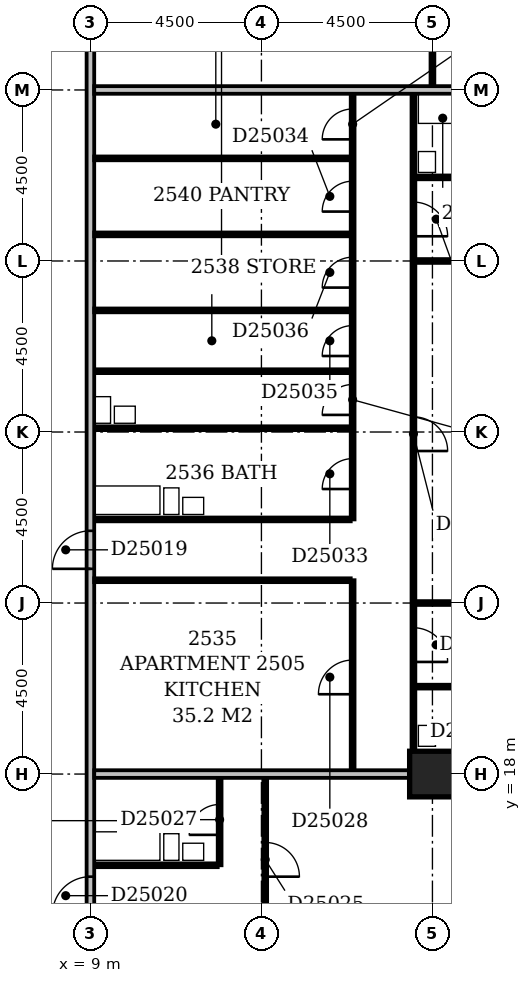
"""IFC4 building model, lengths in metres.
Left out: names, types, materials, properties, quantities, classifications, styles, units other than length and angle.
Written with IfcOpenShell. Run it as: python <this file> out.ifc"""

import sys

from ifc_helpers import new_model, si_unit, direction, frame, frame_2d, origin, origin_2d, place, context, subcontext, project, spatial, rectangle, extrude, element, fill, save


model = new_model("IFC4")
c1 = context("Model", 3, precision=1e-05, world=origin(), true_north=direction((0.0, 1.0)))
c2 = subcontext(c1, "Body", "Model", "MODEL_VIEW")
j1 = project(units=[si_unit("LENGTHUNIT", "METRE"), si_unit("PLANEANGLEUNIT", "RADIAN")], contexts=[c1])
p1 = place(None, origin())
s1 = spatial("IfcSite", under=j1, at=p1, CompositionType="ELEMENT")
p2 = place(p1, origin())
s2 = spatial("IfcBuilding", under=s1, at=p2, CompositionType="ELEMENT")
p3 = place(p2, frame((0.0, 0.0, 101.0)))
s3 = spatial("IfcBuildingStorey", under=s2, at=p3, CompositionType="ELEMENT", Elevation=101.0)
p4 = place(p3, frame((18.0, 18.0, -0.3), z_axis=(0.0, 0.0, 1.0), x_axis=(1.0, 0.0, 0.0)))
e1 = element("IfcColumn", 1, at=p4, inside=s3, PredefinedType="COLUMN", context=c2, shape_type="SweptSolid", body=[
    extrude(rectangle(XDim=1.2, YDim=1.2, at=origin_2d()), origin(), (0.0, 0.0, 1.0), 3.6),
])
p5 = place(p3, frame((9.0, 5.0, 0.0), z_axis=(0.0, 0.0, 1.0), x_axis=(0.0, 1.0, 0.0)))
e2 = element("IfcWall", 2, at=p5, inside=s3, PredefinedType="PARTITIONING", context=c2, shape_type="SweptSolid", body=[
    extrude(rectangle(XDim=44.5, YDim=0.2, at=frame_2d((22.25, 0.0))), origin(), (0.0, 0.0, 1.0), 3.3),
])
p6 = place(p5, frame((18.4, 0.0, 0.0)))
e3 = element("IfcOpeningElement", 3, at=p6, cuts=e2, PredefinedType="OPENING", context=c2, shape_type="SweptSolid", body=[
    extrude(rectangle(XDim=1.0, YDim=2.1, at=frame_2d((0.5, 1.05))), frame((0.0, 0.112, 0.0), z_axis=(0.0, -1.0, 0.0), x_axis=(1.0, 0.0, 0.0)), (0.0, 0.0, 1.0), 0.224),
])
p7 = place(p5, frame((9.3, 0.0, 0.0)))
e4 = element("IfcOpeningElement", 4, at=p7, cuts=e2, PredefinedType="OPENING", context=c2, shape_type="SweptSolid", body=[
    extrude(rectangle(XDim=1.0, YDim=2.1, at=frame_2d((0.5, 1.05))), frame((0.0, 0.112, 0.0), z_axis=(0.0, -1.0, 0.0), x_axis=(1.0, 0.0, 0.0)), (0.0, 0.0, 1.0), 0.224),
])
p8 = place(p5, frame((37.25, 0.0, 0.0)))
e5 = element("IfcOpeningElement", 5, at=p8, cuts=e2, PredefinedType="OPENING", context=c2, shape_type="SweptSolid", body=[
    extrude(rectangle(XDim=0.9, YDim=2.1, at=frame_2d((0.45, 1.05))), frame((0.0, 0.112, 0.0), z_axis=(0.0, -1.0, 0.0), x_axis=(1.0, 0.0, 0.0)), (0.0, 0.0, 1.0), 0.224),
])
p9 = place(p5, frame((1.5, 0.0, 0.0)))
e6 = element("IfcOpeningElement", 6, at=p9, cuts=e2, PredefinedType="OPENING", context=c2, shape_type="SweptSolid", body=[
    extrude(rectangle(XDim=0.9, YDim=2.1, at=frame_2d((0.45, 1.05))), frame((0.0, 0.112, 0.0), z_axis=(0.0, -1.0, 0.0), x_axis=(1.0, 0.0, 0.0)), (0.0, 0.0, 1.0), 0.224),
])
p10 = place(p3, frame((13.6, 9.6, 0.0), z_axis=(0.0, 0.0, 1.0), x_axis=(0.0, 1.0, 0.0)))
e7 = element("IfcWall", 7, at=p10, inside=s3, PredefinedType="PARTITIONING", context=c2, shape_type="SweptSolid", body=[
    extrude(rectangle(XDim=8.3, YDim=0.1, at=frame_2d((4.15, 0.0))), origin(), (0.0, 0.0, 1.0), 3.3),
])
p11 = place(p10, frame((1.2, 0.0, 0.0)))
e8 = element("IfcOpeningElement", 8, at=p11, cuts=e7, PredefinedType="OPENING", context=c2, shape_type="SweptSolid", body=[
    extrude(rectangle(XDim=0.9, YDim=2.1, at=frame_2d((0.45, 1.05))), frame((0.0, 0.062, 0.0), z_axis=(0.0, -1.0, 0.0), x_axis=(1.0, 0.0, 0.0)), (0.0, 0.0, 1.0), 0.124),
])
p12 = place(p10, frame((5.7, 0.0, 0.0)))
e9 = element("IfcOpeningElement", 9, at=p12, cuts=e7, PredefinedType="OPENING", context=c2, shape_type="SweptSolid", body=[
    extrude(rectangle(XDim=0.9, YDim=2.1, at=frame_2d((0.45, 1.05))), frame((0.0, 0.062, 0.0), z_axis=(0.0, -1.0, 0.0), x_axis=(1.0, 0.0, 0.0)), (0.0, 0.0, 1.0), 0.124),
])
p13 = place(p3, frame((9.1, 15.6, 0.0), z_axis=(0.0, 0.0, 1.0), x_axis=(1.0, 0.0, 0.0)))
e10 = element("IfcWall", 10, at=p13, inside=s3, PredefinedType="PLUMBINGWALL", context=c2, shape_type="SweptSolid", body=[
    extrude(rectangle(XDim=3.25, YDim=0.1, at=frame_2d((1.625, 0.0))), origin(), (0.0, 0.0, 1.0), 3.3),
])
p14 = place(p3, frame((12.4, 15.6, 0.0), z_axis=(0.0, 0.0, 1.0), x_axis=(0.0, 1.0, 0.0)))
e11 = element("IfcWall", 11, at=p14, inside=s3, PredefinedType="PARTITIONING", context=c2, shape_type="SweptSolid", body=[
    extrude(rectangle(XDim=2.3, YDim=0.1, at=frame_2d((1.15, 0.0))), origin(), (0.0, 0.0, 1.0), 3.3),
])
p15 = place(p14, frame((0.8, 0.0, 0.0)))
e12 = element("IfcOpeningElement", 12, at=p15, cuts=e11, PredefinedType="OPENING", context=c2, shape_type="SweptSolid", body=[
    extrude(rectangle(XDim=0.8, YDim=2.1, at=frame_2d((0.4, 1.05))), frame((0.0, 0.062, 0.0), z_axis=(0.0, -1.0, 0.0), x_axis=(1.0, 0.0, 0.0)), (0.0, 0.0, 1.0), 0.124),
])
p16 = place(p3, frame((9.1, 18.0, 0.0), z_axis=(0.0, 0.0, 1.0), x_axis=(1.0, 0.0, 0.0)))
e13 = element("IfcWall", 13, at=p16, inside=s3, PredefinedType="PARTITIONING", context=c2, shape_type="SweptSolid", body=[
    extrude(rectangle(XDim=8.3, YDim=0.2, at=frame_2d((4.15, 0.0))), origin(), (0.0, 0.0, 1.0), 2.6),
])
p17 = place(p3, frame((15.9, 18.1, 0.0), z_axis=(0.0, 0.0, 1.0), x_axis=(0.0, 1.0, 0.0)))
e14 = element("IfcWall", 14, at=p17, inside=s3, PredefinedType="PARTITIONING", context=c2, shape_type="SweptSolid", body=[
    extrude(rectangle(XDim=5.0, YDim=0.1, at=frame_2d((2.5, 0.0))), origin(), (0.0, 0.0, 1.0), 3.3),
])
p18 = place(p17, frame((2.0, 0.0, 0.0)))
e15 = element("IfcOpeningElement", 15, at=p18, cuts=e14, PredefinedType="OPENING", context=c2, shape_type="SweptSolid", body=[
    extrude(rectangle(XDim=0.9, YDim=2.1, at=frame_2d((0.45, 1.05))), frame((0.0, 0.062, 0.0), z_axis=(0.0, -1.0, 0.0), x_axis=(1.0, 0.0, 0.0)), (0.0, 0.0, 1.0), 0.124),
])
p19 = place(p3, frame((17.5, 18.1, 0.0), z_axis=(0.0, 0.0, 1.0), x_axis=(0.0, 1.0, 0.0)))
e16 = element("IfcWall", 16, at=p19, inside=s3, PredefinedType="PARTITIONING", context=c2, shape_type="SweptSolid", body=[
    extrude(rectangle(XDim=17.8, YDim=0.1, at=frame_2d((8.9, 0.0))), origin(), (0.0, 0.0, 1.0), 3.3),
])
p20 = place(p19, frame((2.85, 0.0, 0.0)))
e17 = element("IfcOpeningElement", 17, at=p20, cuts=e16, PredefinedType="OPENING", context=c2, shape_type="SweptSolid", body=[
    extrude(rectangle(XDim=0.9, YDim=2.1, at=frame_2d((0.45, 1.05))), frame((0.0, 0.062, 0.0), z_axis=(0.0, -1.0, 0.0), x_axis=(1.0, 0.0, 0.0)), (0.0, 0.0, 1.0), 0.124),
])
p21 = place(p19, frame((8.4, 0.0, 0.0)))
e18 = element("IfcOpeningElement", 18, at=p21, cuts=e16, PredefinedType="OPENING", context=c2, shape_type="SweptSolid", body=[
    extrude(rectangle(XDim=0.9, YDim=2.1, at=frame_2d((0.45, 1.05))), frame((0.0, 0.062, 0.0), z_axis=(0.0, -1.0, 0.0), x_axis=(1.0, 0.0, 0.0)), (0.0, 0.0, 1.0), 0.124),
])
p22 = place(p19, frame((14.05, 0.0, 0.0)))
e19 = element("IfcOpeningElement", 19, at=p22, cuts=e16, PredefinedType="OPENING", context=c2, shape_type="SweptSolid", body=[
    extrude(rectangle(XDim=0.9, YDim=2.1, at=frame_2d((0.45, 1.05))), frame((0.0, 0.062, 0.0), z_axis=(0.0, -1.0, 0.0), x_axis=(1.0, 0.0, 0.0)), (0.0, 0.0, 1.0), 0.124),
])
p23 = place(p3, frame((17.55, 20.3, 0.0), z_axis=(0.0, 0.0, 1.0), x_axis=(1.0, 0.0, 0.0)))
e20 = element("IfcWall", 20, at=p23, inside=s3, PredefinedType="PLUMBINGWALL", context=c2, shape_type="SweptSolid", body=[
    extrude(rectangle(XDim=4.0, YDim=0.1, at=frame_2d((2.0, 0.0))), origin(), (0.0, 0.0, 1.0), 3.3),
])
p24 = place(p23, frame((1.0, 0.0, 0.0)))
e21 = element("IfcOpeningElement", 21, at=p24, cuts=e20, PredefinedType="OPENING", context=c2, shape_type="SweptSolid", body=[
    extrude(rectangle(XDim=0.8, YDim=2.1, at=frame_2d((0.4, 1.05))), frame((0.0, 0.062, 0.0), z_axis=(0.0, -1.0, 0.0), x_axis=(1.0, 0.0, 0.0)), (0.0, 0.0, 1.0), 0.124),
])
p25 = place(p3, frame((17.55, 22.5, 0.0), z_axis=(0.0, 0.0, 1.0), x_axis=(1.0, 0.0, 0.0)))
e22 = element("IfcWall", 22, at=p25, inside=s3, PredefinedType="PARTITIONING", context=c2, shape_type="SweptSolid", body=[
    extrude(rectangle(XDim=4.35, YDim=0.1, at=frame_2d((2.175, 0.0))), origin(), (0.0, 0.0, 1.0), 3.3),
])
p26 = place(p3, frame((9.1, 23.1, 0.0), z_axis=(0.0, 0.0, 1.0), x_axis=(1.0, 0.0, 0.0)))
e23 = element("IfcWall", 23, at=p26, inside=s3, PredefinedType="PARTITIONING", context=c2, shape_type="SweptSolid", body=[
    extrude(rectangle(XDim=6.75, YDim=0.1, at=frame_2d((3.375, 0.0))), origin(), (0.0, 0.0, 1.0), 3.3),
])
p27 = place(p3, frame((9.1, 24.7, 0.0), z_axis=(0.0, 0.0, 1.0), x_axis=(1.0, 0.0, 0.0)))
e24 = element("IfcWall", 24, at=p27, inside=s3, PredefinedType="PLUMBINGWALL", context=c2, shape_type="SweptSolid", body=[
    extrude(rectangle(XDim=6.75, YDim=0.1, at=frame_2d((3.375, 0.0))), origin(), (0.0, 0.0, 1.0), 3.3),
])
p28 = place(p3, frame((15.9, 24.7, 0.0), z_axis=(0.0, 0.0, 1.0), x_axis=(0.0, 1.0, 0.0)))
e25 = element("IfcWall", 25, at=p28, inside=s3, PredefinedType="PARTITIONING", context=c2, shape_type="SweptSolid", body=[
    extrude(rectangle(XDim=11.2, YDim=0.1, at=frame_2d((5.6, 0.0))), origin(), (0.0, 0.0, 1.0), 3.3),
])
p29 = place(p28, frame((0.8, 0.0, 0.0)))
e26 = element("IfcOpeningElement", 26, at=p29, cuts=e25, PredefinedType="OPENING", context=c2, shape_type="SweptSolid", body=[
    extrude(rectangle(XDim=0.8, YDim=2.1, at=frame_2d((0.4, 1.05))), frame((0.0, 0.062, 0.0), z_axis=(0.0, -1.0, 0.0), x_axis=(1.0, 0.0, 0.0)), (0.0, 0.0, 1.0), 0.124),
])
p30 = place(p28, frame((8.1, 0.0, 0.0)))
e27 = element("IfcOpeningElement", 27, at=p30, cuts=e25, PredefinedType="OPENING", context=c2, shape_type="SweptSolid", body=[
    extrude(rectangle(XDim=0.8, YDim=2.1, at=frame_2d((0.4, 1.05))), frame((0.0, 0.062, 0.0), z_axis=(0.0, -1.0, 0.0), x_axis=(1.0, 0.0, 0.0)), (0.0, 0.0, 1.0), 0.124),
])
p31 = place(p28, frame((4.3, 0.0, 0.0)))
e28 = element("IfcOpeningElement", 28, at=p31, cuts=e25, PredefinedType="OPENING", context=c2, shape_type="SweptSolid", body=[
    extrude(rectangle(XDim=0.8, YDim=2.1, at=frame_2d((0.4, 1.05))), frame((0.0, 0.062, 0.0), z_axis=(0.0, -1.0, 0.0), x_axis=(1.0, 0.0, 0.0)), (0.0, 0.0, 1.0), 0.124),
])
p32 = place(p28, frame((6.1, 0.0, 0.0)))
e29 = element("IfcOpeningElement", 29, at=p32, cuts=e25, PredefinedType="OPENING", context=c2, shape_type="SweptSolid", body=[
    extrude(rectangle(XDim=0.8, YDim=2.1, at=frame_2d((0.4, 1.05))), frame((0.0, 0.062, 0.0), z_axis=(0.0, -1.0, 0.0), x_axis=(1.0, 0.0, 0.0)), (0.0, 0.0, 1.0), 0.124),
])
p33 = place(p28, frame((10.0, 0.0, 0.0)))
e30 = element("IfcOpeningElement", 30, at=p33, cuts=e25, PredefinedType="OPENING", context=c2, shape_type="SweptSolid", body=[
    extrude(rectangle(XDim=0.8, YDim=2.1, at=frame_2d((0.4, 1.05))), frame((0.0, 0.062, 0.0), z_axis=(0.0, -1.0, 0.0), x_axis=(1.0, 0.0, 0.0)), (0.0, 0.0, 1.0), 0.124),
])
p34 = place(p28, frame((2.75, 0.0, 0.0)))
e31 = element("IfcOpeningElement", 31, at=p34, cuts=e25, PredefinedType="OPENING", context=c2, shape_type="SweptSolid", body=[
    extrude(rectangle(XDim=0.8, YDim=2.1, at=frame_2d((0.4, 1.05))), frame((0.0, 0.062, 0.0), z_axis=(0.0, -1.0, 0.0), x_axis=(1.0, 0.0, 0.0)), (0.0, 0.0, 1.0), 0.124),
])
p35 = place(p3, frame((9.1, 27.1, 0.0), z_axis=(0.0, 0.0, 1.0), x_axis=(1.0, 0.0, 0.0)))
e32 = element("IfcWall", 32, at=p35, inside=s3, PredefinedType="PLUMBINGWALL", context=c2, shape_type="SweptSolid", body=[
    extrude(rectangle(XDim=6.75, YDim=0.1, at=frame_2d((3.375, 0.0))), origin(), (0.0, 0.0, 1.0), 2.7),
])
p36 = place(p3, frame((9.1, 28.6, 0.0), z_axis=(0.0, 0.0, 1.0), x_axis=(1.0, 0.0, 0.0)))
e33 = element("IfcWall", 33, at=p36, inside=s3, PredefinedType="PLUMBINGWALL", context=c2, shape_type="SweptSolid", body=[
    extrude(rectangle(XDim=6.75, YDim=0.1, at=frame_2d((3.375, 0.0))), origin(), (0.0, 0.0, 1.0), 3.3),
])
p37 = place(p3, frame((9.1, 30.2, 0.0), z_axis=(0.0, 0.0, 1.0), x_axis=(1.0, 0.0, 0.0)))
e34 = element("IfcWall", 34, at=p37, inside=s3, PredefinedType="PARTITIONING", context=c2, shape_type="SweptSolid", body=[
    extrude(rectangle(XDim=6.75, YDim=0.1, at=frame_2d((3.375, 0.0))), origin(), (0.0, 0.0, 1.0), 3.3),
])
p38 = place(p3, frame((17.55, 31.5, 0.0), z_axis=(0.0, 0.0, 1.0), x_axis=(1.0, 0.0, 0.0)))
e35 = element("IfcWall", 35, at=p38, inside=s3, PredefinedType="PARTITIONING", context=c2, shape_type="SweptSolid", body=[
    extrude(rectangle(XDim=4.35, YDim=0.1, at=frame_2d((2.175, 0.0))), origin(), (0.0, 0.0, 1.0), 3.3),
])
p39 = place(p3, frame((9.1, 32.2, 0.0), z_axis=(0.0, 0.0, 1.0), x_axis=(1.0, 0.0, 0.0)))
e36 = element("IfcWall", 36, at=p39, inside=s3, PredefinedType="PARTITIONING", context=c2, shape_type="SweptSolid", body=[
    extrude(rectangle(XDim=6.75, YDim=0.1, at=frame_2d((3.375, 0.0))), origin(), (0.0, 0.0, 1.0), 3.3),
])
p40 = place(p3, frame((17.55, 33.7, 0.0), z_axis=(0.0, 0.0, 1.0), x_axis=(1.0, 0.0, 0.0)))
e37 = element("IfcWall", 37, at=p40, inside=s3, PredefinedType="PLUMBINGWALL", context=c2, shape_type="SweptSolid", body=[
    extrude(rectangle(XDim=2.8, YDim=0.1, at=frame_2d((1.4, 0.0))), origin(), (0.0, 0.0, 1.0), 3.3),
])
p41 = place(p40, frame((1.0, 0.0, 0.0)))
e38 = element("IfcOpeningElement", 38, at=p41, cuts=e37, PredefinedType="OPENING", context=c2, shape_type="SweptSolid", body=[
    extrude(rectangle(XDim=0.8, YDim=2.1, at=frame_2d((0.4, 1.05))), frame((0.0, 0.062, 0.0), z_axis=(0.0, -1.0, 0.0), x_axis=(1.0, 0.0, 0.0)), (0.0, 0.0, 1.0), 0.124),
])
p42 = place(p3, frame((9.1, 34.2, 0.0), z_axis=(0.0, 0.0, 1.0), x_axis=(1.0, 0.0, 0.0)))
e39 = element("IfcWall", 39, at=p42, inside=s3, PredefinedType="PARTITIONING", context=c2, shape_type="SweptSolid", body=[
    extrude(rectangle(XDim=6.75, YDim=0.1, at=frame_2d((3.375, 0.0))), origin(), (0.0, 0.0, 1.0), 3.3),
])
p43 = place(p3, frame((9.1, 36.0, 0.0), z_axis=(0.0, 0.0, 1.0), x_axis=(1.0, 0.0, 0.0)))
e40 = element("IfcWall", 40, at=p43, inside=s3, PredefinedType="PARTITIONING", context=c2, shape_type="SweptSolid", body=[
    extrude(rectangle(XDim=12.8, YDim=0.2, at=frame_2d((6.4, 0.0))), origin(), (0.0, 0.0, 1.0), 2.4),
])
p44 = place(p3, frame((18.0, 36.1, 0.0), z_axis=(0.0, 0.0, 1.0), x_axis=(0.0, 1.0, 0.0)))
e41 = element("IfcWall", 41, at=p44, inside=s3, PredefinedType="PARTITIONING", context=c2, shape_type="SweptSolid", body=[
    extrude(rectangle(XDim=13.3, YDim=0.1, at=frame_2d((6.65, 0.0))), origin(), (0.0, 0.0, 1.0), 3.3),
])
p45 = place(p6, origin())
e42 = element("IfcDoor", 42, at=p45, inside=s3, OperationType="SINGLE_SWING_LEFT", PredefinedType="DOOR", context=c2, shape_type="SweptSolid", body=[
    extrude(rectangle(XDim=1.0, YDim=2.1, at=frame_2d((0.5, 1.05))), frame((0.0, 0.025, 0.0), z_axis=(0.0, -1.0, 0.0), x_axis=(1.0, 0.0, 0.0)), (0.0, 0.0, 1.0), 0.05),
])
fill(e3, e42)
p46 = place(p7, origin())
e43 = element("IfcDoor", 43, at=p46, inside=s3, OperationType="SINGLE_SWING_LEFT", PredefinedType="DOOR", context=c2, shape_type="SweptSolid", body=[
    extrude(rectangle(XDim=1.0, YDim=2.1, at=frame_2d((0.5, 1.05))), frame((0.0, 0.025, 0.0), z_axis=(0.0, -1.0, 0.0), x_axis=(1.0, 0.0, 0.0)), (0.0, 0.0, 1.0), 0.05),
])
fill(e4, e43)
p47 = place(p12, frame((0.9, 0.0, 0.0), z_axis=(0.0, 0.0, 1.0), x_axis=(-1.0, 0.0, 0.0)))
e44 = element("IfcDoor", 44, at=p47, inside=s3, OperationType="SINGLE_SWING_RIGHT", PredefinedType="DOOR", context=c2, shape_type="SweptSolid", body=[
    extrude(rectangle(XDim=0.9, YDim=2.1, at=frame_2d((0.45, 1.05))), frame((0.0, 0.025, 0.0), z_axis=(0.0, -1.0, 0.0), x_axis=(1.0, 0.0, 0.0)), (0.0, 0.0, 1.0), 0.05),
])
fill(e9, e44)
p48 = place(p15, origin())
e45 = element("IfcDoor", 45, at=p48, inside=s3, OperationType="SINGLE_SWING_LEFT", PredefinedType="DOOR", context=c2, shape_type="SweptSolid", body=[
    extrude(rectangle(XDim=0.8, YDim=2.1, at=frame_2d((0.4, 1.05))), frame((0.0, 0.025, 0.0), z_axis=(0.0, -1.0, 0.0), x_axis=(1.0, 0.0, 0.0)), (0.0, 0.0, 1.0), 0.05),
])
fill(e12, e45)
p49 = place(p18, origin())
e46 = element("IfcDoor", 46, at=p49, inside=s3, OperationType="SINGLE_SWING_LEFT", PredefinedType="DOOR", context=c2, shape_type="SweptSolid", body=[
    extrude(rectangle(XDim=0.9, YDim=2.1, at=frame_2d((0.45, 1.05))), frame((0.0, 0.025, 0.0), z_axis=(0.0, -1.0, 0.0), x_axis=(1.0, 0.0, 0.0)), (0.0, 0.0, 1.0), 0.05),
])
fill(e15, e46)
p50 = place(p20, frame((0.9, 0.0, 0.0), z_axis=(0.0, 0.0, 1.0), x_axis=(-1.0, 0.0, 0.0)))
e47 = element("IfcDoor", 47, at=p50, inside=s3, OperationType="SINGLE_SWING_RIGHT", PredefinedType="DOOR", context=c2, shape_type="SweptSolid", body=[
    extrude(rectangle(XDim=0.9, YDim=2.1, at=frame_2d((0.45, 1.05))), frame((0.0, 0.025, 0.0), z_axis=(0.0, -1.0, 0.0), x_axis=(1.0, 0.0, 0.0)), (0.0, 0.0, 1.0), 0.05),
])
fill(e17, e47)
p51 = place(p21, frame((0.9, 0.0, 0.0), z_axis=(0.0, 0.0, 1.0), x_axis=(-1.0, 0.0, 0.0)))
e48 = element("IfcDoor", 48, at=p51, inside=s3, OperationType="SINGLE_SWING_RIGHT", PredefinedType="DOOR", context=c2, shape_type="SweptSolid", body=[
    extrude(rectangle(XDim=0.9, YDim=2.1, at=frame_2d((0.45, 1.05))), frame((0.0, 0.025, 0.0), z_axis=(0.0, -1.0, 0.0), x_axis=(1.0, 0.0, 0.0)), (0.0, 0.0, 1.0), 0.05),
])
fill(e18, e48)
p52 = place(p22, frame((0.9, 0.0, 0.0), z_axis=(0.0, 0.0, 1.0), x_axis=(-1.0, 0.0, 0.0)))
e49 = element("IfcDoor", 49, at=p52, inside=s3, OperationType="SINGLE_SWING_RIGHT", PredefinedType="DOOR", context=c2, shape_type="SweptSolid", body=[
    extrude(rectangle(XDim=0.9, YDim=2.1, at=frame_2d((0.45, 1.05))), frame((0.0, 0.025, 0.0), z_axis=(0.0, -1.0, 0.0), x_axis=(1.0, 0.0, 0.0)), (0.0, 0.0, 1.0), 0.05),
])
fill(e19, e49)
p53 = place(p29, origin())
e50 = element("IfcDoor", 50, at=p53, inside=s3, OperationType="SINGLE_SWING_LEFT", PredefinedType="DOOR", context=c2, shape_type="SweptSolid", body=[
    extrude(rectangle(XDim=0.8, YDim=2.1, at=frame_2d((0.4, 1.05))), frame((0.0, 0.025, 0.0), z_axis=(0.0, -1.0, 0.0), x_axis=(1.0, 0.0, 0.0)), (0.0, 0.0, 1.0), 0.05),
])
fill(e26, e50)
p54 = place(p30, origin())
e51 = element("IfcDoor", 51, at=p54, inside=s3, OperationType="SINGLE_SWING_LEFT", PredefinedType="DOOR", context=c2, shape_type="SweptSolid", body=[
    extrude(rectangle(XDim=0.8, YDim=2.1, at=frame_2d((0.4, 1.05))), frame((0.0, 0.025, 0.0), z_axis=(0.0, -1.0, 0.0), x_axis=(1.0, 0.0, 0.0)), (0.0, 0.0, 1.0), 0.05),
])
fill(e27, e51)
p55 = place(p31, origin())
e52 = element("IfcDoor", 52, at=p55, inside=s3, OperationType="SINGLE_SWING_LEFT", PredefinedType="DOOR", context=c2, shape_type="SweptSolid", body=[
    extrude(rectangle(XDim=0.8, YDim=2.1, at=frame_2d((0.4, 1.05))), frame((0.0, 0.025, 0.0), z_axis=(0.0, -1.0, 0.0), x_axis=(1.0, 0.0, 0.0)), (0.0, 0.0, 1.0), 0.05),
])
fill(e28, e52)
p56 = place(p32, origin())
e53 = element("IfcDoor", 53, at=p56, inside=s3, OperationType="SINGLE_SWING_LEFT", PredefinedType="DOOR", context=c2, shape_type="SweptSolid", body=[
    extrude(rectangle(XDim=0.8, YDim=2.1, at=frame_2d((0.4, 1.05))), frame((0.0, 0.025, 0.0), z_axis=(0.0, -1.0, 0.0), x_axis=(1.0, 0.0, 0.0)), (0.0, 0.0, 1.0), 0.05),
])
fill(e29, e53)
p57 = place(p33, origin())
e54 = element("IfcDoor", 54, at=p57, inside=s3, OperationType="SINGLE_SWING_LEFT", PredefinedType="DOOR", context=c2, shape_type="SweptSolid", body=[
    extrude(rectangle(XDim=0.8, YDim=2.1, at=frame_2d((0.4, 1.05))), frame((0.0, 0.025, 0.0), z_axis=(0.0, -1.0, 0.0), x_axis=(1.0, 0.0, 0.0)), (0.0, 0.0, 1.0), 0.05),
])
fill(e30, e54)
p58 = place(p34, origin())
e55 = element("IfcDoor", 55, at=p58, inside=s3, OperationType="SINGLE_SWING_LEFT", PredefinedType="DOOR", context=c2, shape_type="SweptSolid", body=[
    extrude(rectangle(XDim=0.8, YDim=2.1, at=frame_2d((0.4, 1.05))), frame((0.0, 0.025, 0.0), z_axis=(0.0, -1.0, 0.0), x_axis=(1.0, 0.0, 0.0)), (0.0, 0.0, 1.0), 0.05),
])
fill(e31, e55)
save(model, sys.argv[1])
